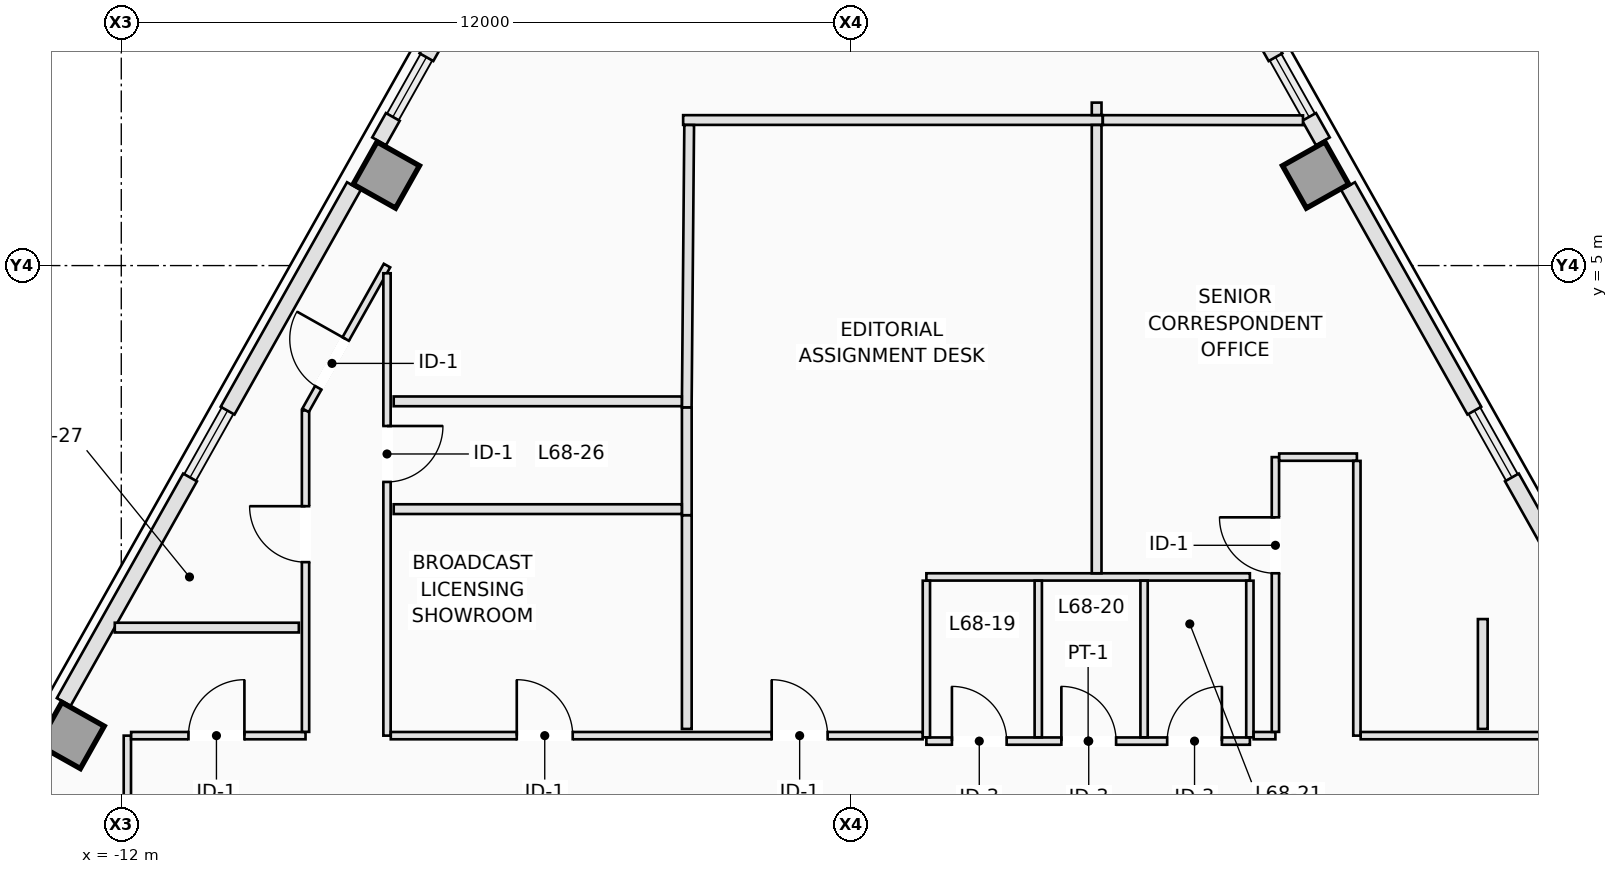
"""IFC4 building model, lengths in metres.
Left out: names, types, materials, properties, quantities, classifications, styles, units other than length and angle.
Written with IfcOpenShell. Run it as: python <this file> out.ifc"""

import sys

from ifc_helpers import new_model, si_unit, direction, frame, frame_2d, origin, origin_2d, place, context, subcontext, project, spatial, rectangle, extrude, element, fill, save


model = new_model("IFC4")
c1 = context("Model", 3, precision=1e-05, world=origin(), true_north=direction((0.0, 1.0)))
c2 = subcontext(c1, "Body", "Model", "MODEL_VIEW")
j1 = project(units=[si_unit("LENGTHUNIT", "METRE"), si_unit("PLANEANGLEUNIT", "RADIAN")], contexts=[c1])
p1 = place(None, origin())
s1 = spatial("IfcSite", under=j1, at=p1, CompositionType="ELEMENT")
p2 = place(p1, origin())
s2 = spatial("IfcBuilding", under=s1, at=p2, CompositionType="ELEMENT")
p3 = place(p2, frame((0.0, 0.0, 246.4)))
s3 = spatial("IfcBuildingStorey", under=s2, at=p3, CompositionType="ELEMENT", Elevation=246.4)
for number, where, z_axis, x_axis in (
    (1, (7.642, 6.489, 0.0), (0.0, 0.0, 1.0), (0.872, 0.49, 0.0)),
    (2, (-7.642, 6.489, 0.0), (0.0, 0.0, 1.0), (-0.872, 0.49, 0.0)),
    (3, (-12.825, -2.727, 0.0), (0.0, 0.0, 1.0), (-0.872, 0.49, 0.0)),
):
    element("IfcColumn", number, at=place(p3, frame(where, z_axis=z_axis, x_axis=x_axis)), inside=s3, PredefinedType="COLUMN", context=c2, shape_type="SweptSolid", body=[
        extrude(rectangle(XDim=0.8, YDim=0.8, at=origin_2d()), origin(), (0.0, 0.0, 1.0), 3.5),
    ])
p4 = place(p3, frame((4.33, 13.142, 0.0), z_axis=(0.0, 0.0, 1.0), x_axis=(0.490265525523, -0.871573126297, 0.0)))
e4 = element("IfcWall", 4, at=p4, inside=s3, PredefinedType="STANDARD", context=c2, shape_type="SweptSolid", body=[
    extrude(rectangle(XDim=5.409, YDim=0.26, at=frame_2d((2.705, 0.0))), origin(), (0.0, 0.0, 1.0), 3.25),
])
p5 = place(p3, frame((7.534, 7.445, 0.0), z_axis=(0.0, 0.0, 1.0), x_axis=(0.490412424957, -0.871490478116, 0.0)))
e5 = element("IfcWall", 5, at=p5, inside=s3, PredefinedType="STANDARD", context=c2, shape_type="SweptSolid", body=[
    extrude(rectangle(XDim=0.46, YDim=0.26, at=frame_2d((0.23, 0.0))), origin(), (0.0, 0.0, 1.0), 3.25),
])
p6 = place(p3, frame((8.174, 6.307, 0.0), z_axis=(0.0, 0.0, 1.0), x_axis=(0.490269447258, -0.871570920284, 0.0)))
e6 = element("IfcWall", 6, at=p6, inside=s3, PredefinedType="STANDARD", context=c2, shape_type="SweptSolid", body=[
    extrude(rectangle(XDim=4.237, YDim=0.26, at=frame_2d((2.118, 0.0))), origin(), (0.0, 0.0, 1.0), 3.25),
])
p7 = place(p3, frame((10.869, 1.516, 0.0), z_axis=(0.0, 0.0, 1.0), x_axis=(0.490244825075, -0.871584770109, 0.0)))
e7 = element("IfcWall", 7, at=p7, inside=s3, PredefinedType="STANDARD", context=c2, shape_type="SweptSolid", body=[
    extrude(rectangle(XDim=4.237, YDim=0.26, at=frame_2d((2.119, 0.0))), origin(), (0.0, 0.0, 1.0), 3.25),
])
p8 = place(p3, frame((-7.76, 7.044, 0.0), z_axis=(0.0, 0.0, 1.0), x_axis=(0.490412424957, 0.871490478116, 0.0)))
e8 = element("IfcWall", 8, at=p8, inside=s3, PredefinedType="STANDARD", context=c2, shape_type="SweptSolid", body=[
    extrude(rectangle(XDim=0.46, YDim=0.26, at=frame_2d((0.23, 0.0))), origin(), (0.0, 0.0, 1.0), 3.25),
])
p9 = place(p3, frame((-6.982, 8.427, 0.0), z_axis=(0.0, 0.0, 1.0), x_axis=(0.490265525523, 0.871573126297, 0.0)))
e9 = element("IfcWall", 9, at=p9, inside=s3, PredefinedType="STANDARD", context=c2, shape_type="SweptSolid", body=[
    extrude(rectangle(XDim=5.409, YDim=0.26, at=frame_2d((2.705, 0.0))), origin(), (0.0, 0.0, 1.0), 3.25),
])
p10 = place(p3, frame((-12.946, -2.177, 0.0), z_axis=(0.0, 0.0, 1.0), x_axis=(0.490244825075, 0.871584770109, 0.0)))
e10 = element("IfcWall", 10, at=p10, inside=s3, PredefinedType="STANDARD", context=c2, shape_type="SweptSolid", body=[
    extrude(rectangle(XDim=4.237, YDim=0.26, at=frame_2d((2.119, 0.0))), origin(), (0.0, 0.0, 1.0), 3.25),
])
p11 = place(p3, frame((-10.251, 2.615, 0.0), z_axis=(0.0, 0.0, 1.0), x_axis=(0.490269447258, 0.871570920284, 0.0)))
e11 = element("IfcWall", 11, at=p11, inside=s3, PredefinedType="STANDARD", context=c2, shape_type="SweptSolid", body=[
    extrude(rectangle(XDim=4.237, YDim=0.26, at=frame_2d((2.118, 0.0))), origin(), (0.0, 0.0, 1.0), 3.25),
])
p12 = place(p3, frame((1.24, -2.82, 0.0), z_axis=(0.0, 0.0, 1.0), x_axis=(1.0, 0.0, 0.0)))
e12 = element("IfcWall", 12, at=p12, inside=s3, PredefinedType="PARTITIONING", context=c2, shape_type="SweptSolid", body=[
    extrude(rectangle(XDim=5.32, YDim=0.12, at=frame_2d((2.66, 0.0))), origin(), (0.0, 0.0, 1.0), 2.943),
])
p13 = place(p12, frame((0.42, 0.0, 0.0)))
e13 = element("IfcOpeningElement", 13, at=p13, cuts=e12, PredefinedType="OPENING", context=c2, shape_type="SweptSolid", body=[
    extrude(rectangle(XDim=0.9, YDim=2.12, at=frame_2d((0.45, 1.06))), frame((0.0, 0.07, 0.0), z_axis=(0.0, -1.0, 0.0), x_axis=(1.0, 0.0, 0.0)), (0.0, 0.0, 1.0), 0.14),
])
p14 = place(p12, frame((2.22, 0.0, 0.0)))
e14 = element("IfcOpeningElement", 14, at=p14, cuts=e12, PredefinedType="OPENING", context=c2, shape_type="SweptSolid", body=[
    extrude(rectangle(XDim=0.9, YDim=2.12, at=frame_2d((0.45, 1.06))), frame((0.0, 0.07, 0.0), z_axis=(0.0, -1.0, 0.0), x_axis=(1.0, 0.0, 0.0)), (0.0, 0.0, 1.0), 0.14),
])
p15 = place(p12, frame((3.96, 0.0, 0.0)))
e15 = element("IfcOpeningElement", 15, at=p15, cuts=e12, PredefinedType="OPENING", context=c2, shape_type="SweptSolid", body=[
    extrude(rectangle(XDim=0.9, YDim=2.12, at=frame_2d((0.45, 1.06))), frame((0.0, 0.07, 0.0), z_axis=(0.0, -1.0, 0.0), x_axis=(1.0, 0.0, 0.0)), (0.0, 0.0, 1.0), 0.14),
])
p16 = place(p3, frame((1.24, -0.12, 0.0), z_axis=(0.0, 0.0, 1.0), x_axis=(1.0, 0.0, 0.0)))
e16 = element("IfcWall", 16, at=p16, inside=s3, PredefinedType="PARTITIONING", context=c2, shape_type="SweptSolid", body=[
    extrude(rectangle(XDim=5.32, YDim=0.12, at=frame_2d((2.66, 0.0))), origin(), (0.0, 0.0, 1.0), 3.25),
])
for number, where, z_axis, x_axis in (
    (17, (1.24, -2.758, 0.0), (0.0, 0.0, 1.0), (0.0, 1.0, 0.0)),
    (18, (3.08, -2.758, 0.0), (0.0, 0.0, 1.0), (0.0, 1.0, 0.0)),
    (19, (4.82, -2.758, 0.0), (0.0, 0.0, 1.0), (0.0, 1.0, 0.0)),
    (20, (6.56, -2.758, 0.0), (0.0, 0.0, 1.0), (0.0, 1.0, 0.0)),
):
    element("IfcWall", number, at=place(p3, frame(where, z_axis=z_axis, x_axis=x_axis)), inside=s3, PredefinedType="PARTITIONING", context=c2, shape_type="SweptSolid", body=[
        extrude(rectangle(XDim=2.576, YDim=0.12, at=frame_2d((1.288, 0.0))), origin(), (0.0, 0.0, 1.0), 3.25),
    ])
p17 = place(p3, frame((-11.9, -5.073, 0.0), z_axis=(0.0, 0.0, 1.0), x_axis=(0.0, 1.0, 0.0)))
e21 = element("IfcWall", 21, at=p17, inside=s3, PredefinedType="PARTITIONING", context=c2, shape_type="SweptSolid", body=[
    extrude(rectangle(XDim=2.343, YDim=0.12, at=frame_2d((1.171, 0.0))), origin(), (0.0, 0.0, 1.0), 3.25),
])
p18 = place(p3, frame((-11.838, -2.73, 0.0), z_axis=(0.0, 0.0, 1.0), x_axis=(1.0, 0.0, 0.0)))
e22 = element("IfcWall", 22, at=p18, inside=s3, PredefinedType="PARTITIONING", context=c2, shape_type="SweptSolid", body=[
    extrude(rectangle(XDim=2.868, YDim=0.12, at=frame_2d((1.434, 0.0))), origin(), (0.0, 0.0, 1.0), 3.25),
])
p19 = place(p18, frame((0.943, 0.0, 0.0)))
e23 = element("IfcOpeningElement", 23, at=p19, cuts=e22, PredefinedType="OPENING", context=c2, shape_type="SweptSolid", body=[
    extrude(rectangle(XDim=0.92, YDim=2.12, at=frame_2d((0.46, 1.06))), frame((0.0, 0.07, 0.0), z_axis=(0.0, -1.0, 0.0), x_axis=(1.0, 0.0, 0.0)), (0.0, 0.0, 1.0), 0.14),
])
p20 = place(p3, frame((-8.97, -2.668, 0.0), z_axis=(0.0, 0.0, 1.0), x_axis=(0.0, 1.0, 0.0)))
e24 = element("IfcWall", 24, at=p20, inside=s3, PredefinedType="PARTITIONING", context=c2, shape_type="SweptSolid", body=[
    extrude(rectangle(XDim=5.286, YDim=0.12, at=frame_2d((2.643, 0.0))), origin(), (0.0, 0.0, 1.0), 3.25),
])
p21 = place(p20, frame((2.791, 0.0, 0.0)))
e25 = element("IfcOpeningElement", 25, at=p21, cuts=e24, PredefinedType="OPENING", context=c2, shape_type="SweptSolid", body=[
    extrude(rectangle(XDim=0.92, YDim=2.12, at=frame_2d((0.46, 1.06))), frame((0.0, 0.07, 0.0), z_axis=(0.0, -1.0, 0.0), x_axis=(1.0, 0.0, 0.0)), (0.0, 0.0, 1.0), 0.14),
])
p22 = place(p3, frame((-8.969, 2.62, 0.0), z_axis=(0.0, 0.0, 1.0), x_axis=(0.490341880416, 0.871530171773, 0.0)))
e26 = element("IfcWall", 26, at=p22, inside=s3, PredefinedType="PARTITIONING", context=c2, shape_type="SweptSolid", body=[
    extrude(rectangle(XDim=2.731, YDim=0.12, at=frame_2d((1.365, 0.0))), origin(), (0.0, 0.0, 1.0), 3.25),
])
p23 = place(p22, frame((0.425, 0.0, 0.0)))
e27 = element("IfcOpeningElement", 27, at=p23, cuts=e26, PredefinedType="OPENING", context=c2, shape_type="SweptSolid", body=[
    extrude(rectangle(XDim=0.92, YDim=2.12, at=frame_2d((0.46, 1.06))), frame((0.0, 0.07, 0.0), z_axis=(0.0, -1.0, 0.0), x_axis=(1.0, 0.0, 0.0)), (0.0, 0.0, 1.0), 0.14),
])
p24 = place(p3, frame((-7.63, 4.874, 0.0), z_axis=(0.0, 0.0, 1.0), x_axis=(0.0, -1.0, 0.0)))
e28 = element("IfcWall", 28, at=p24, inside=s3, PredefinedType="PARTITIONING", context=c2, shape_type="SweptSolid", body=[
    extrude(rectangle(XDim=7.604, YDim=0.12, at=frame_2d((3.802, 0.0))), origin(), (0.0, 0.0, 1.0), 3.25),
])
p25 = place(p24, frame((2.512, 0.0, 0.0)))
e29 = element("IfcOpeningElement", 29, at=p25, cuts=e28, PredefinedType="OPENING", context=c2, shape_type="SweptSolid", body=[
    extrude(rectangle(XDim=0.92, YDim=2.12, at=frame_2d((0.46, 1.06))), frame((0.0, 0.07, 0.0), z_axis=(0.0, -1.0, 0.0), x_axis=(1.0, 0.0, 0.0)), (0.0, 0.0, 1.0), 0.14),
])
p26 = place(p3, frame((-7.568, -2.73, 0.0), z_axis=(0.0, 0.0, 1.0), x_axis=(1.0, 0.0, 0.0)))
e30 = element("IfcWall", 30, at=p26, inside=s3, PredefinedType="PARTITIONING", context=c2, shape_type="SweptSolid", body=[
    extrude(rectangle(XDim=8.746, YDim=0.12, at=frame_2d((4.373, 0.0))), origin(), (0.0, 0.0, 1.0), 2.943),
])
p27 = place(p26, frame((6.264, 0.0, 0.0)))
e31 = element("IfcOpeningElement", 31, at=p27, cuts=e30, PredefinedType="OPENING", context=c2, shape_type="SweptSolid", body=[
    extrude(rectangle(XDim=0.92, YDim=2.12, at=frame_2d((0.46, 1.06))), frame((0.0, 0.07, 0.0), z_axis=(0.0, -1.0, 0.0), x_axis=(1.0, 0.0, 0.0)), (0.0, 0.0, 1.0), 0.14),
])
p28 = place(p26, frame((2.072, 0.0, 0.0)))
e32 = element("IfcOpeningElement", 32, at=p28, cuts=e30, PredefinedType="OPENING", context=c2, shape_type="SweptSolid", body=[
    extrude(rectangle(XDim=0.92, YDim=2.12, at=frame_2d((0.46, 1.06))), frame((0.0, 0.07, 0.0), z_axis=(0.0, -1.0, 0.0), x_axis=(1.0, 0.0, 0.0)), (0.0, 0.0, 1.0), 0.14),
])
p29 = place(p3, frame((6.622, -2.73, 0.0), z_axis=(0.0, 0.0, 1.0), x_axis=(1.0, 0.0, 0.0)))
e33 = element("IfcWall", 33, at=p29, inside=s3, PredefinedType="PARTITIONING", context=c2, shape_type="SweptSolid", body=[
    extrude(rectangle(XDim=0.358, YDim=0.12, at=frame_2d((0.179, 0.0))), origin(), (0.0, 0.0, 1.0), 3.25),
])
p30 = place(p3, frame((6.98, -2.668, 0.0), z_axis=(0.0, 0.0, 1.0), x_axis=(0.0, 1.0, 0.0)))
e34 = element("IfcWall", 34, at=p30, inside=s3, PredefinedType="PARTITIONING", context=c2, shape_type="SweptSolid", body=[
    extrude(rectangle(XDim=4.518, YDim=0.12, at=frame_2d((2.259, 0.0))), origin(), (0.0, 0.0, 1.0), 3.25),
])
p31 = place(p30, frame((2.608, 0.0, 0.0)))
e35 = element("IfcOpeningElement", 35, at=p31, cuts=e34, PredefinedType="OPENING", context=c2, shape_type="SweptSolid", body=[
    extrude(rectangle(XDim=0.92, YDim=2.12, at=frame_2d((0.46, 1.06))), frame((0.0, 0.07, 0.0), z_axis=(0.0, -1.0, 0.0), x_axis=(1.0, 0.0, 0.0)), (0.0, 0.0, 1.0), 0.14),
])
p32 = place(p3, frame((7.042, 1.85, 0.0), z_axis=(0.0, 0.0, 1.0), x_axis=(1.0, 0.0, 0.0)))
e36 = element("IfcWall", 36, at=p32, inside=s3, PredefinedType="PARTITIONING", context=c2, shape_type="SweptSolid", body=[
    extrude(rectangle(XDim=1.278, YDim=0.12, at=frame_2d((0.639, 0.0))), origin(), (0.0, 0.0, 1.0), 3.25),
])
p33 = place(p3, frame((8.32, 1.788, 0.0), z_axis=(0.0, 0.0, 1.0), x_axis=(0.0, -1.0, 0.0)))
e37 = element("IfcWall", 37, at=p33, inside=s3, PredefinedType="PARTITIONING", context=c2, shape_type="SweptSolid", body=[
    extrude(rectangle(XDim=4.518, YDim=0.12, at=frame_2d((2.259, 0.0))), origin(), (0.0, 0.0, 1.0), 3.25),
])
p34 = place(p3, frame((8.382, -2.73, 0.0), z_axis=(0.0, 0.0, 1.0), x_axis=(1.0, 0.0, 0.0)))
e38 = element("IfcWall", 38, at=p34, inside=s3, PredefinedType="PARTITIONING", context=c2, shape_type="SweptSolid", body=[
    extrude(rectangle(XDim=3.518, YDim=0.12, at=frame_2d((1.759, 0.0))), origin(), (0.0, 0.0, 1.0), 3.25),
])
p35 = place(p3, frame((4.14, 7.394, 0.0), z_axis=(0.0, 0.0, 1.0), x_axis=(-1.0, 0.0, 0.0)))
e39 = element("IfcWall", 39, at=p35, inside=s3, PredefinedType="PARTITIONING", context=c2, shape_type="SweptSolid", body=[
    extrude(rectangle(XDim=6.9, YDim=0.16, at=frame_2d((3.45, 0.0))), origin(), (0.0, 0.0, 1.0), 3.25),
])
p36 = place(p3, frame((-2.661, 7.312, 0.0), z_axis=(0.0, 0.0, 1.0), x_axis=(-0.008673840445, -0.999962381538, 0.0)))
e40 = element("IfcWall", 40, at=p36, inside=s3, PredefinedType="PARTITIONING", context=c2, shape_type="SweptSolid", body=[
    extrude(rectangle(XDim=4.644, YDim=0.16, at=frame_2d((2.322, 0.0))), origin(), (0.0, 0.0, 1.0), 3.25),
])
p37 = place(p3, frame((7.433, 7.39, 0.0), z_axis=(0.0, 0.0, 1.0), x_axis=(-0.999999460761, 0.001038498068, 0.0)))
e41 = element("IfcWall", 41, at=p37, inside=s3, PredefinedType="PARTITIONING", context=c2, shape_type="SweptSolid", body=[
    extrude(rectangle(XDim=3.291, YDim=0.16, at=frame_2d((1.646, 0.0))), origin(), (0.0, 0.0, 1.0), 3.25),
])
p38 = place(p3, frame((-2.782, 2.767, 0.0), z_axis=(0.0, 0.0, 1.0), x_axis=(-1.0, 0.0, 0.0)))
e42 = element("IfcWall", 42, at=p38, inside=s3, PredefinedType="PARTITIONING", context=c2, shape_type="SweptSolid", body=[
    extrude(rectangle(XDim=4.738, YDim=0.16, at=frame_2d((2.369, 0.0))), origin(), (0.0, 0.0, 1.0), 2.943),
])
p39 = place(p3, frame((4.04, 7.68, 0.0), z_axis=(0.0, 0.0, 1.0), x_axis=(0.0, -1.0, 0.0)))
e43 = element("IfcWall", 43, at=p39, inside=s3, PredefinedType="PARTITIONING", context=c2, shape_type="SweptSolid", body=[
    extrude(rectangle(XDim=0.204, YDim=0.16, at=frame_2d((0.102, 0.0))), origin(), (0.0, 0.0, 1.0), 3.25),
])
p40 = place(p3, frame((4.04, 7.312, 0.0), z_axis=(0.0, 0.0, 1.0), x_axis=(0.0, -1.0, 0.0)))
e44 = element("IfcWall", 44, at=p40, inside=s3, PredefinedType="PARTITIONING", context=c2, shape_type="SweptSolid", body=[
    extrude(rectangle(XDim=7.372, YDim=0.16, at=frame_2d((3.686, 0.0))), origin(), (0.0, 0.0, 1.0), 3.25),
])
p41 = place(p3, frame((-2.7, 0.895, 0.0), z_axis=(0.0, 0.0, 1.0), x_axis=(0.0, 1.0, 0.0)))
e45 = element("IfcWall", 45, at=p41, inside=s3, PredefinedType="PARTITIONING", context=c2, shape_type="SweptSolid", body=[
    extrude(rectangle(XDim=1.771, YDim=0.16, at=frame_2d((0.885, 0.0))), origin(), (0.0, 0.0, 1.0), 3.25),
])
p42 = place(p3, frame((-2.7, -2.62, 0.0), z_axis=(0.0, 0.0, 1.0), x_axis=(0.0, 1.0, 0.0)))
e46 = element("IfcWall", 46, at=p42, inside=s3, PredefinedType="PARTITIONING", context=c2, shape_type="SweptSolid", body=[
    extrude(rectangle(XDim=3.513, YDim=0.16, at=frame_2d((1.756, 0.0))), origin(), (0.0, 0.0, 1.0), 3.25),
])
p43 = place(p3, frame((10.39, -0.813, 0.0), z_axis=(0.0, 0.0, 1.0), x_axis=(0.0, -1.0, 0.0)))
e47 = element("IfcWall", 47, at=p43, inside=s3, PredefinedType="PARTITIONING", context=c2, shape_type="SweptSolid", body=[
    extrude(rectangle(XDim=1.807, YDim=0.16, at=frame_2d((0.903, 0.0))), origin(), (0.0, 0.0, 1.0), 3.25),
])
p44 = place(p3, frame((-2.782, 0.995, 0.0), z_axis=(0.0, 0.0, 1.0), x_axis=(-1.0, 0.0, 0.0)))
e48 = element("IfcWall", 48, at=p44, inside=s3, PredefinedType="PARTITIONING", context=c2, shape_type="SweptSolid", body=[
    extrude(rectangle(XDim=4.738, YDim=0.16, at=frame_2d((2.369, 0.0))), origin(), (0.0, 0.0, 1.0), 2.943),
])
p45 = place(p3, frame((-9.08, -0.953, 0.0), z_axis=(0.0, 0.0, 1.0), x_axis=(-1.0, 0.0, 0.0)))
e49 = element("IfcWall", 49, at=p45, inside=s3, PredefinedType="PARTITIONING", context=c2, shape_type="SweptSolid", body=[
    extrude(rectangle(XDim=3.027, YDim=0.16, at=frame_2d((1.513, 0.0))), origin(), (0.0, 0.0, 1.0), 3.25),
])
p46 = place(p13, origin())
e50 = element("IfcDoor", 50, at=p46, inside=s3, OperationType="SINGLE_SWING_LEFT", PredefinedType="DOOR", context=c2, shape_type="SweptSolid", body=[
    extrude(rectangle(XDim=0.9, YDim=2.12, at=frame_2d((0.45, 1.06))), frame((0.0, 0.025, 0.0), z_axis=(0.0, -1.0, 0.0), x_axis=(1.0, 0.0, 0.0)), (0.0, 0.0, 1.0), 0.05),
])
fill(e13, e50)
p47 = place(p14, origin())
e51 = element("IfcDoor", 51, at=p47, inside=s3, OperationType="SINGLE_SWING_LEFT", PredefinedType="DOOR", context=c2, shape_type="SweptSolid", body=[
    extrude(rectangle(XDim=0.9, YDim=2.12, at=frame_2d((0.45, 1.06))), frame((0.0, 0.025, 0.0), z_axis=(0.0, -1.0, 0.0), x_axis=(1.0, 0.0, 0.0)), (0.0, 0.0, 1.0), 0.05),
])
fill(e14, e51)
p48 = place(p15, origin())
e52 = element("IfcDoor", 52, at=p48, inside=s3, OperationType="SINGLE_SWING_RIGHT", PredefinedType="DOOR", context=c2, shape_type="SweptSolid", body=[
    extrude(rectangle(XDim=0.9, YDim=2.12, at=frame_2d((0.45, 1.06))), frame((0.0, 0.025, 0.0), z_axis=(0.0, -1.0, 0.0), x_axis=(1.0, 0.0, 0.0)), (0.0, 0.0, 1.0), 0.05),
])
fill(e15, e52)
p49 = place(p23, origin())
e53 = element("IfcDoor", 53, at=p49, inside=s3, OperationType="SINGLE_SWING_RIGHT", PredefinedType="DOOR", context=c2, shape_type="SweptSolid", body=[
    extrude(rectangle(XDim=0.92, YDim=2.12, at=frame_2d((0.46, 1.06))), frame((0.0, 0.025, 0.0), z_axis=(0.0, -1.0, 0.0), x_axis=(1.0, 0.0, 0.0)), (0.0, 0.0, 1.0), 0.05),
])
fill(e27, e53)
p50 = place(p27, origin())
e54 = element("IfcDoor", 54, at=p50, inside=s3, OperationType="SINGLE_SWING_LEFT", PredefinedType="DOOR", context=c2, shape_type="SweptSolid", body=[
    extrude(rectangle(XDim=0.92, YDim=2.12, at=frame_2d((0.46, 1.06))), frame((0.0, 0.025, 0.0), z_axis=(0.0, -1.0, 0.0), x_axis=(1.0, 0.0, 0.0)), (0.0, 0.0, 1.0), 0.05),
])
fill(e31, e54)
p51 = place(p31, origin())
e55 = element("IfcDoor", 55, at=p51, inside=s3, OperationType="SINGLE_SWING_RIGHT", PredefinedType="DOOR", context=c2, shape_type="SweptSolid", body=[
    extrude(rectangle(XDim=0.92, YDim=2.12, at=frame_2d((0.46, 1.06))), frame((0.0, 0.025, 0.0), z_axis=(0.0, -1.0, 0.0), x_axis=(1.0, 0.0, 0.0)), (0.0, 0.0, 1.0), 0.05),
])
fill(e35, e55)
p52 = place(p25, origin())
e56 = element("IfcDoor", 56, at=p52, inside=s3, OperationType="SINGLE_SWING_LEFT", PredefinedType="DOOR", context=c2, shape_type="SweptSolid", body=[
    extrude(rectangle(XDim=0.92, YDim=2.12, at=frame_2d((0.46, 1.06))), frame((0.0, 0.025, 0.0), z_axis=(0.0, -1.0, 0.0), x_axis=(1.0, 0.0, 0.0)), (0.0, 0.0, 1.0), 0.05),
])
fill(e29, e56)
p53 = place(p21, origin())
e57 = element("IfcDoor", 57, at=p53, inside=s3, OperationType="SINGLE_SWING_RIGHT", PredefinedType="DOOR", context=c2, shape_type="SweptSolid", body=[
    extrude(rectangle(XDim=0.92, YDim=2.12, at=frame_2d((0.46, 1.06))), frame((0.0, 0.025, 0.0), z_axis=(0.0, -1.0, 0.0), x_axis=(1.0, 0.0, 0.0)), (0.0, 0.0, 1.0), 0.05),
])
fill(e25, e57)
p54 = place(p28, origin())
e58 = element("IfcDoor", 58, at=p54, inside=s3, OperationType="SINGLE_SWING_LEFT", PredefinedType="DOOR", context=c2, shape_type="SweptSolid", body=[
    extrude(rectangle(XDim=0.92, YDim=2.12, at=frame_2d((0.46, 1.06))), frame((0.0, 0.025, 0.0), z_axis=(0.0, -1.0, 0.0), x_axis=(1.0, 0.0, 0.0)), (0.0, 0.0, 1.0), 0.05),
])
fill(e32, e58)
p55 = place(p19, origin())
e59 = element("IfcDoor", 59, at=p55, inside=s3, OperationType="SINGLE_SWING_RIGHT", PredefinedType="DOOR", context=c2, shape_type="SweptSolid", body=[
    extrude(rectangle(XDim=0.92, YDim=2.12, at=frame_2d((0.46, 1.06))), frame((0.0, 0.025, 0.0), z_axis=(0.0, -1.0, 0.0), x_axis=(1.0, 0.0, 0.0)), (0.0, 0.0, 1.0), 0.05),
])
fill(e23, e59)
save(model, sys.argv[1])
